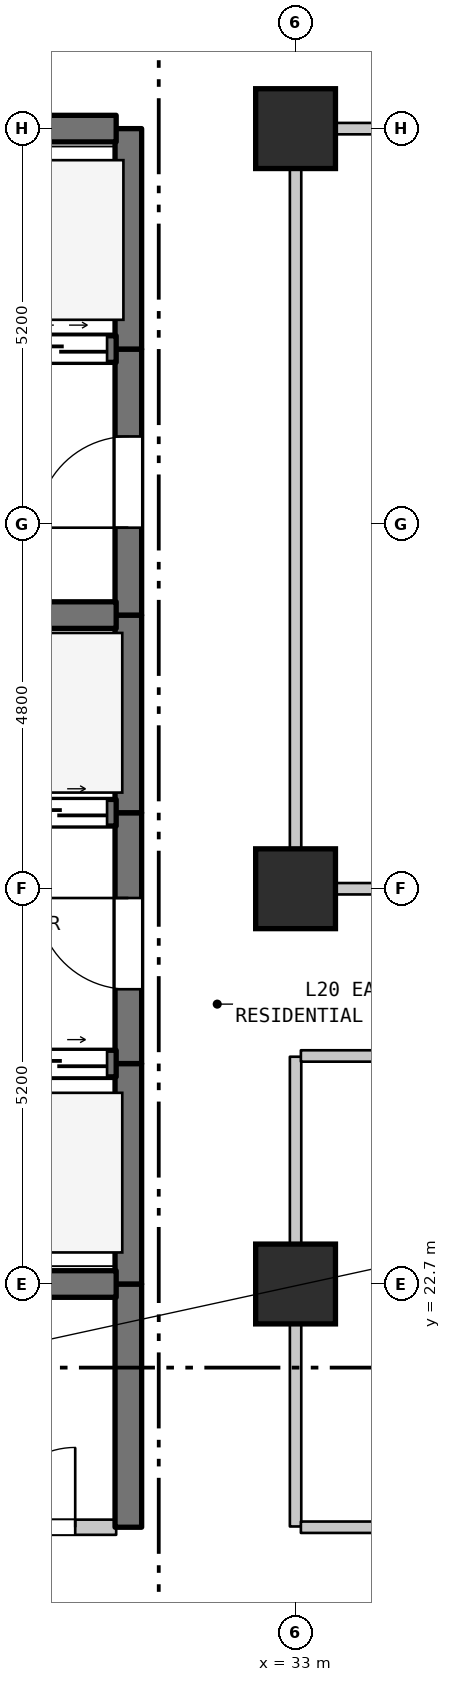
"""IFC4 building model, lengths in metres.
Left out: names, types, materials, properties, quantities, classifications, styles, units other than length and angle.
Written with IfcOpenShell. Run it as: python <this file> out.ifc"""

import sys

from ifc_helpers import new_model, si_unit, direction, frame, frame_2d, origin, origin_2d, place, context, subcontext, project, spatial, rectangle, extrude, element, fill, save


model = new_model("IFC4")
c1 = context("Model", 3, precision=1e-05, world=origin(), true_north=direction((0.0, 1.0)))
c2 = subcontext(c1, "Body", "Model", "MODEL_VIEW")
j1 = project(units=[si_unit("LENGTHUNIT", "METRE"), si_unit("PLANEANGLEUNIT", "RADIAN")], contexts=[c1])
p1 = place(None, origin())
s1 = spatial("IfcSite", under=j1, at=p1, CompositionType="ELEMENT")
p2 = place(p1, origin())
s2 = spatial("IfcBuilding", under=s1, at=p2, CompositionType="ELEMENT")
p3 = place(p2, frame((0.0, 0.0, 86.4)))
s3 = spatial("IfcBuildingStorey", under=s2, at=p3, CompositionType="ELEMENT", Elevation=86.4)
for number, where, z_axis, x_axis in (
    (1, (33.0, 22.7, 0.0), (0.0, 0.0, 1.0), (1.0, 0.0, 0.0)),
    (2, (33.0, 27.9, 0.0), (0.0, 0.0, 1.0), (1.0, 0.0, 0.0)),
    (3, (33.0, 37.9, 0.0), (0.0, 0.0, 1.0), (1.0, 0.0, 0.0)),
):
    element("IfcColumn", number, at=place(p3, frame(where, z_axis=z_axis, x_axis=x_axis)), inside=s3, PredefinedType="COLUMN", context=c2, shape_type="SweptSolid", body=[
        extrude(rectangle(XDim=1.05, YDim=1.05, at=origin_2d()), origin(), (0.0, 0.0, 1.0), 4.5),
    ])
p4 = place(p3, frame((30.8, 19.5, 0.0), z_axis=(0.0, 0.0, 1.0), x_axis=(0.0, 1.0, 0.0)))
e4 = element("IfcWall", 4, at=p4, inside=s3, PredefinedType="SHEAR", context=c2, shape_type="SweptSolid", body=[
    extrude(rectangle(XDim=3.2, YDim=0.35, at=frame_2d((1.6, 0.0))), origin(), (0.0, 0.0, 1.0), 4.185),
])
p5 = place(p3, frame((30.8, 22.7, 0.0), z_axis=(0.0, 0.0, 1.0), x_axis=(0.0, 1.0, 0.0)))
e5 = element("IfcWall", 5, at=p5, inside=s3, PredefinedType="SHEAR", context=c2, shape_type="SweptSolid", body=[
    extrude(rectangle(XDim=2.9, YDim=0.35, at=frame_2d((1.45, 0.0))), origin(), (0.0, 0.0, 1.0), 4.185),
])
p6 = place(p3, frame((30.8, 25.6, 0.0), z_axis=(0.0, 0.0, 1.0), x_axis=(0.0, 1.0, 0.0)))
e6 = element("IfcWall", 6, at=p6, inside=s3, PredefinedType="SHEAR", context=c2, shape_type="SweptSolid", body=[
    extrude(rectangle(XDim=3.3, YDim=0.35, at=frame_2d((1.65, 0.0))), origin(), (0.0, 0.0, 1.0), 4.185),
])
p7 = place(p6, frame((0.978, 0.0, 0.0)))
e7 = element("IfcOpeningElement", 7, at=p7, cuts=e6, PredefinedType="OPENING", context=c2, shape_type="SweptSolid", body=[
    extrude(rectangle(XDim=1.2, YDim=2.2, at=frame_2d((0.6, 1.1))), frame((0.0, 0.185, 0.0), z_axis=(0.0, -1.0, 0.0), x_axis=(1.0, 0.0, 0.0)), (0.0, 0.0, 1.0), 0.37),
])
p8 = place(p3, frame((30.8, 28.9, 0.0), z_axis=(0.0, 0.0, 1.0), x_axis=(0.0, 1.0, 0.0)))
e8 = element("IfcWall", 8, at=p8, inside=s3, PredefinedType="SHEAR", context=c2, shape_type="SweptSolid", body=[
    extrude(rectangle(XDim=2.6, YDim=0.35, at=frame_2d((1.3, 0.0))), origin(), (0.0, 0.0, 1.0), 4.185),
])
p9 = place(p3, frame((30.8, 31.5, 0.0), z_axis=(0.0, 0.0, 1.0), x_axis=(0.0, 1.0, 0.0)))
e9 = element("IfcWall", 9, at=p9, inside=s3, PredefinedType="SHEAR", context=c2, shape_type="SweptSolid", body=[
    extrude(rectangle(XDim=3.5, YDim=0.35, at=frame_2d((1.75, 0.0))), origin(), (0.0, 0.0, 1.0), 4.185),
])
p10 = place(p9, frame((1.15, 0.0, 0.0)))
e10 = element("IfcOpeningElement", 10, at=p10, cuts=e9, PredefinedType="OPENING", context=c2, shape_type="SweptSolid", body=[
    extrude(rectangle(XDim=1.2, YDim=2.2, at=frame_2d((0.6, 1.1))), frame((0.0, 0.185, 0.0), z_axis=(0.0, -1.0, 0.0), x_axis=(1.0, 0.0, 0.0)), (0.0, 0.0, 1.0), 0.37),
])
p11 = place(p3, frame((30.8, 35.0, 0.0), z_axis=(0.0, 0.0, 1.0), x_axis=(0.0, 1.0, 0.0)))
e11 = element("IfcWall", 11, at=p11, inside=s3, PredefinedType="SHEAR", context=c2, shape_type="SweptSolid", body=[
    extrude(rectangle(XDim=2.9, YDim=0.35, at=frame_2d((1.45, 0.0))), origin(), (0.0, 0.0, 1.0), 4.185),
])
p12 = place(p3, frame((33.0, 19.51, 0.0), z_axis=(0.0, 0.0, 1.0), x_axis=(0.0, 1.0, 0.0)))
e12 = element("IfcWall", 12, at=p12, inside=s3, PredefinedType="STANDARD", context=c2, shape_type="SweptSolid", body=[
    extrude(rectangle(XDim=6.18, YDim=0.15, at=frame_2d((3.09, 0.0))), origin(), (0.0, 0.0, 1.0), 3.735),
])
p13 = place(p3, frame((33.0, 27.91, 0.0), z_axis=(0.0, 0.0, 1.0), x_axis=(0.0, 1.0, 0.0)))
e13 = element("IfcWall", 13, at=p13, inside=s3, PredefinedType="STANDARD", context=c2, shape_type="SweptSolid", body=[
    extrude(rectangle(XDim=9.98, YDim=0.15, at=frame_2d((4.99, 0.0))), origin(), (0.0, 0.0, 1.0), 3.685),
])
p14 = place(p3, frame((28.585, 19.5, 0.0), z_axis=(0.0, 0.0, 1.0), x_axis=(1.0, 0.0, 0.0)))
e14 = element("IfcWall", 14, at=p14, inside=s3, PredefinedType="STANDARD", context=c2, shape_type="SweptSolid", body=[
    extrude(rectangle(XDim=2.055, YDim=0.2, at=frame_2d((1.027, 0.0))), origin(), (0.0, 0.0, 1.0), 4.185),
])
p15 = place(p14, frame((0.466, 0.0, 0.0)))
e15 = element("IfcOpeningElement", 15, at=p15, cuts=e14, PredefinedType="OPENING", context=c2, shape_type="SweptSolid", body=[
    extrude(rectangle(XDim=1.05, YDim=2.15, at=frame_2d((0.525, 1.075))), frame((0.0, 0.11, 0.0), z_axis=(0.0, -1.0, 0.0), x_axis=(1.0, 0.0, 0.0)), (0.0, 0.0, 1.0), 0.22),
])
p16 = place(p3, frame((33.07, 19.5, 0.0), z_axis=(0.0, 0.0, 1.0), x_axis=(1.0, 0.0, 0.0)))
e16 = element("IfcWall", 16, at=p16, inside=s3, PredefinedType="STANDARD", context=c2, shape_type="SweptSolid", body=[
    extrude(rectangle(XDim=21.51, YDim=0.15, at=frame_2d((10.755, 0.0))), origin(), (0.0, 0.0, 1.0), 4.185),
])
p17 = place(p3, frame((28.585, 22.7, 0.0), z_axis=(0.0, 0.0, 1.0), x_axis=(1.0, 0.0, 0.0)))
e17 = element("IfcWall", 17, at=p17, inside=s3, PredefinedType="SHEAR", context=c2, shape_type="SweptSolid", body=[
    extrude(rectangle(XDim=2.055, YDim=0.35, at=frame_2d((1.027, 0.0))), origin(), (0.0, 0.0, 1.0), 4.185),
])
p18 = place(p3, frame((27.46, 25.6, 0.0), z_axis=(0.0, 0.0, 1.0), x_axis=(1.0, 0.0, 0.0)))
e18 = element("IfcWall", 18, at=p18, inside=s3, PredefinedType="SHEAR", context=c2, shape_type="SweptSolid", body=[
    extrude(rectangle(XDim=3.18, YDim=0.35, at=frame_2d((1.59, 0.0))), origin(), (0.0, 0.0, 1.0), 4.185),
])
p19 = place(p18, frame((0.12, 0.0, 0.0)))
e19 = element("IfcOpeningElement", 19, at=p19, cuts=e18, PredefinedType="OPENING", context=c2, shape_type="SweptSolid", body=[
    extrude(rectangle(XDim=1.25, YDim=2.2, at=frame_2d((0.625, 1.1))), frame((0.0, 0.185, 0.0), z_axis=(0.0, -1.0, 0.0), x_axis=(1.0, 0.0, 0.0)), (0.0, 0.0, 1.0), 0.37),
])
p20 = place(p18, frame((1.81, 0.0, 0.0)))
e20 = element("IfcOpeningElement", 20, at=p20, cuts=e18, PredefinedType="OPENING", context=c2, shape_type="SweptSolid", body=[
    extrude(rectangle(XDim=1.25, YDim=2.2, at=frame_2d((0.625, 1.1))), frame((0.0, 0.185, 0.0), z_axis=(0.0, -1.0, 0.0), x_axis=(1.0, 0.0, 0.0)), (0.0, 0.0, 1.0), 0.37),
])
p21 = place(p3, frame((33.07, 25.7, 0.0), z_axis=(0.0, 0.0, 1.0), x_axis=(1.0, 0.0, 0.0)))
e21 = element("IfcWall", 21, at=p21, inside=s3, PredefinedType="STANDARD", context=c2, shape_type="SweptSolid", body=[
    extrude(rectangle(XDim=21.51, YDim=0.15, at=frame_2d((10.755, 0.0))), origin(), (0.0, 0.0, 1.0), 4.185),
])
p22 = place(p3, frame((33.07, 27.9, 0.0), z_axis=(0.0, 0.0, 1.0), x_axis=(1.0, 0.0, 0.0)))
e22 = element("IfcWall", 22, at=p22, inside=s3, PredefinedType="STANDARD", context=c2, shape_type="SweptSolid", body=[
    extrude(rectangle(XDim=11.93, YDim=0.15, at=frame_2d((5.965, 0.0))), origin(), (0.0, 0.0, 1.0), 3.685),
])
p23 = place(p22, frame((10.185, 0.0, 0.0)))
e23 = element("IfcOpeningElement", 23, at=p23, cuts=e22, PredefinedType="OPENING", context=c2, shape_type="SweptSolid", body=[
    extrude(rectangle(XDim=1.0, YDim=2.15, at=frame_2d((0.5, 1.075))), frame((0.0, 0.085, 0.0), z_axis=(0.0, -1.0, 0.0), x_axis=(1.0, 0.0, 0.0)), (0.0, 0.0, 1.0), 0.17),
])
p24 = place(p3, frame((27.46, 28.9, 0.0), z_axis=(0.0, 0.0, 1.0), x_axis=(1.0, 0.0, 0.0)))
e24 = element("IfcWall", 24, at=p24, inside=s3, PredefinedType="SHEAR", context=c2, shape_type="SweptSolid", body=[
    extrude(rectangle(XDim=3.18, YDim=0.35, at=frame_2d((1.59, 0.0))), origin(), (0.0, 0.0, 1.0), 4.185),
])
p25 = place(p24, frame((0.12, 0.0, 0.0)))
e25 = element("IfcOpeningElement", 25, at=p25, cuts=e24, PredefinedType="OPENING", context=c2, shape_type="SweptSolid", body=[
    extrude(rectangle(XDim=1.25, YDim=2.2, at=frame_2d((0.625, 1.1))), frame((0.0, 0.185, 0.0), z_axis=(0.0, -1.0, 0.0), x_axis=(1.0, 0.0, 0.0)), (0.0, 0.0, 1.0), 0.37),
])
p26 = place(p24, frame((1.81, 0.0, 0.0)))
e26 = element("IfcOpeningElement", 26, at=p26, cuts=e24, PredefinedType="OPENING", context=c2, shape_type="SweptSolid", body=[
    extrude(rectangle(XDim=1.25, YDim=2.2, at=frame_2d((0.625, 1.1))), frame((0.0, 0.185, 0.0), z_axis=(0.0, -1.0, 0.0), x_axis=(1.0, 0.0, 0.0)), (0.0, 0.0, 1.0), 0.37),
])
p27 = place(p3, frame((27.46, 31.5, 0.0), z_axis=(0.0, 0.0, 1.0), x_axis=(1.0, 0.0, 0.0)))
e27 = element("IfcWall", 27, at=p27, inside=s3, PredefinedType="SHEAR", context=c2, shape_type="SweptSolid", body=[
    extrude(rectangle(XDim=3.18, YDim=0.35, at=frame_2d((1.59, 0.0))), origin(), (0.0, 0.0, 1.0), 4.185),
])
p28 = place(p3, frame((19.16, 35.0, 0.0), z_axis=(0.0, 0.0, 1.0), x_axis=(1.0, 0.0, 0.0)))
e28 = element("IfcWall", 28, at=p28, inside=s3, PredefinedType="SHEAR", context=c2, shape_type="SweptSolid", body=[
    extrude(rectangle(XDim=11.48, YDim=0.35, at=frame_2d((5.74, 0.0))), origin(), (0.0, 0.0, 1.0), 4.185),
])
p29 = place(p28, frame((0.365, 0.0, 0.0)))
e29 = element("IfcOpeningElement", 29, at=p29, cuts=e28, PredefinedType="OPENING", context=c2, shape_type="SweptSolid", body=[
    extrude(rectangle(XDim=1.35, YDim=2.2, at=frame_2d((0.675, 1.1))), frame((0.0, 0.185, 0.0), z_axis=(0.0, -1.0, 0.0), x_axis=(1.0, 0.0, 0.0)), (0.0, 0.0, 1.0), 0.37),
])
p30 = place(p28, frame((2.765, 0.0, 0.0)))
e30 = element("IfcOpeningElement", 30, at=p30, cuts=e28, PredefinedType="OPENING", context=c2, shape_type="SweptSolid", body=[
    extrude(rectangle(XDim=1.35, YDim=2.2, at=frame_2d((0.675, 1.1))), frame((0.0, 0.185, 0.0), z_axis=(0.0, -1.0, 0.0), x_axis=(1.0, 0.0, 0.0)), (0.0, 0.0, 1.0), 0.37),
])
p31 = place(p28, frame((4.915, 0.0, 0.0)))
e31 = element("IfcOpeningElement", 31, at=p31, cuts=e28, PredefinedType="OPENING", context=c2, shape_type="SweptSolid", body=[
    extrude(rectangle(XDim=1.2, YDim=2.2, at=frame_2d((0.6, 1.1))), frame((0.0, 0.185, 0.0), z_axis=(0.0, -1.0, 0.0), x_axis=(1.0, 0.0, 0.0)), (0.0, 0.0, 1.0), 0.37),
])
p32 = place(p28, frame((6.665, 0.0, 0.0)))
e32 = element("IfcOpeningElement", 32, at=p32, cuts=e28, PredefinedType="OPENING", context=c2, shape_type="SweptSolid", body=[
    extrude(rectangle(XDim=1.2, YDim=2.2, at=frame_2d((0.6, 1.1))), frame((0.0, 0.185, 0.0), z_axis=(0.0, -1.0, 0.0), x_axis=(1.0, 0.0, 0.0)), (0.0, 0.0, 1.0), 0.37),
])
p33 = place(p28, frame((8.415, 0.0, 0.0)))
e33 = element("IfcOpeningElement", 33, at=p33, cuts=e28, PredefinedType="OPENING", context=c2, shape_type="SweptSolid", body=[
    extrude(rectangle(XDim=1.2, YDim=2.2, at=frame_2d((0.6, 1.1))), frame((0.0, 0.185, 0.0), z_axis=(0.0, -1.0, 0.0), x_axis=(1.0, 0.0, 0.0)), (0.0, 0.0, 1.0), 0.37),
])
p34 = place(p28, frame((10.16, 0.0, 0.0)))
e34 = element("IfcOpeningElement", 34, at=p34, cuts=e28, PredefinedType="OPENING", context=c2, shape_type="SweptSolid", body=[
    extrude(rectangle(XDim=1.2, YDim=2.2, at=frame_2d((0.6, 1.1))), frame((0.0, 0.185, 0.0), z_axis=(0.0, -1.0, 0.0), x_axis=(1.0, 0.0, 0.0)), (0.0, 0.0, 1.0), 0.37),
])
p35 = place(p3, frame((19.16, 37.9, 0.0), z_axis=(0.0, 0.0, 1.0), x_axis=(1.0, 0.0, 0.0)))
e35 = element("IfcWall", 35, at=p35, inside=s3, PredefinedType="SHEAR", context=c2, shape_type="SweptSolid", body=[
    extrude(rectangle(XDim=11.48, YDim=0.35, at=frame_2d((5.74, 0.0))), origin(), (0.0, 0.0, 1.0), 4.185),
])
p36 = place(p3, frame((33.07, 37.9, 0.0), z_axis=(0.0, 0.0, 1.0), x_axis=(1.0, 0.0, 0.0)))
e36 = element("IfcWall", 36, at=p36, inside=s3, PredefinedType="STANDARD", context=c2, shape_type="SweptSolid", body=[
    extrude(rectangle(XDim=26.935, YDim=0.15, at=frame_2d((13.467, 0.0))), origin(), (0.0, 0.0, 1.0), 4.185),
])
p37 = place(p36, frame((12.96, 0.0, 0.0)))
e37 = element("IfcOpeningElement", 37, at=p37, cuts=e36, PredefinedType="OPENING", context=c2, shape_type="SweptSolid", body=[
    extrude(rectangle(XDim=1.0, YDim=2.15, at=frame_2d((0.5, 1.075))), frame((0.0, 0.085, 0.0), z_axis=(0.0, -1.0, 0.0), x_axis=(1.0, 0.0, 0.0)), (0.0, 0.0, 1.0), 0.17),
])
p38 = place(p7, origin())
e38 = element("IfcDoor", 38, at=p38, inside=s3, OperationType="SINGLE_SWING_RIGHT", PredefinedType="DOOR", context=c2, shape_type="SweptSolid", body=[
    extrude(rectangle(XDim=1.2, YDim=2.2, at=frame_2d((0.6, 1.1))), frame((0.0, 0.025, 0.0), z_axis=(0.0, -1.0, 0.0), x_axis=(1.0, 0.0, 0.0)), (0.0, 0.0, 1.0), 0.05),
])
fill(e7, e38)
p39 = place(p10, origin())
e39 = element("IfcDoor", 39, at=p39, inside=s3, OperationType="SINGLE_SWING_LEFT", PredefinedType="DOOR", context=c2, shape_type="SweptSolid", body=[
    extrude(rectangle(XDim=1.2, YDim=2.2, at=frame_2d((0.6, 1.1))), frame((0.0, 0.025, 0.0), z_axis=(0.0, -1.0, 0.0), x_axis=(1.0, 0.0, 0.0)), (0.0, 0.0, 1.0), 0.05),
])
fill(e10, e39)
p40 = place(p15, origin())
e40 = element("IfcDoor", 40, at=p40, inside=s3, OperationType="SINGLE_SWING_RIGHT", PredefinedType="DOOR", context=c2, shape_type="SweptSolid", body=[
    extrude(rectangle(XDim=1.05, YDim=2.15, at=frame_2d((0.525, 1.075))), frame((0.0, 0.025, 0.0), z_axis=(0.0, -1.0, 0.0), x_axis=(1.0, 0.0, 0.0)), (0.0, 0.0, 1.0), 0.05),
])
fill(e15, e40)
p41 = place(p20, origin())
e41 = element("IfcDoor", 41, at=p41, inside=s3, OperationType="DOUBLE_DOOR_SLIDING", PredefinedType="DOOR", context=c2, shape_type="SweptSolid", body=[
    extrude(rectangle(XDim=1.25, YDim=2.2, at=frame_2d((0.625, 1.1))), frame((0.0, 0.025, 0.0), z_axis=(0.0, -1.0, 0.0), x_axis=(1.0, 0.0, 0.0)), (0.0, 0.0, 1.0), 0.05),
])
fill(e20, e41)
p42 = place(p26, origin())
e42 = element("IfcDoor", 42, at=p42, inside=s3, OperationType="DOUBLE_DOOR_SLIDING", PredefinedType="DOOR", context=c2, shape_type="SweptSolid", body=[
    extrude(rectangle(XDim=1.25, YDim=2.2, at=frame_2d((0.625, 1.1))), frame((0.0, 0.025, 0.0), z_axis=(0.0, -1.0, 0.0), x_axis=(1.0, 0.0, 0.0)), (0.0, 0.0, 1.0), 0.05),
])
fill(e26, e42)
p43 = place(p34, origin())
e43 = element("IfcDoor", 43, at=p43, inside=s3, OperationType="DOUBLE_DOOR_SLIDING", PredefinedType="DOOR", context=c2, shape_type="SweptSolid", body=[
    extrude(rectangle(XDim=1.2, YDim=2.2, at=frame_2d((0.6, 1.1))), frame((0.0, 0.025, 0.0), z_axis=(0.0, -1.0, 0.0), x_axis=(1.0, 0.0, 0.0)), (0.0, 0.0, 1.0), 0.05),
])
fill(e34, e43)
save(model, sys.argv[1])
